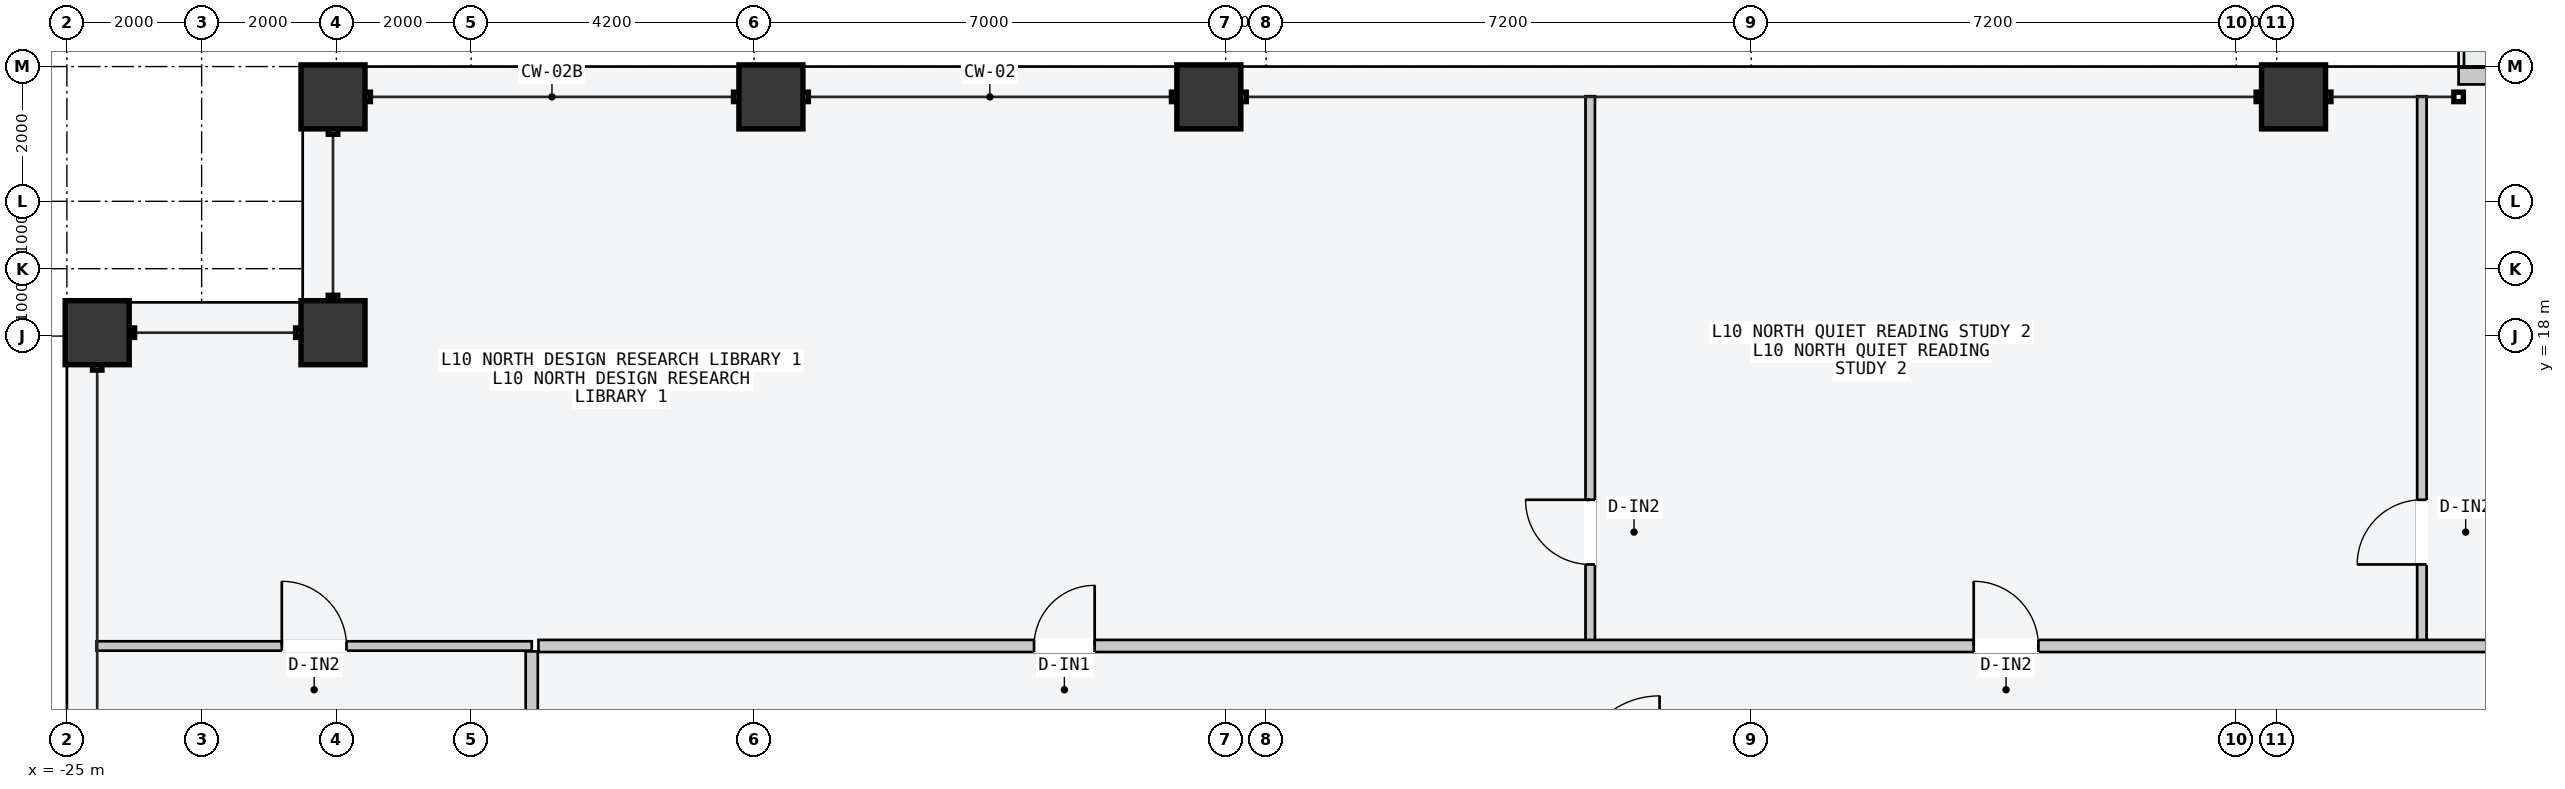
"""IFC4 building model, lengths in metres.
Left out: names, types, materials, properties, quantities, classifications, styles, units other than length and angle.
Written with IfcOpenShell. Run it as: python <this file> out.ifc"""

import sys

from ifc_helpers import new_model, si_unit, direction, frame, frame_2d, origin, origin_2d, place, context, subcontext, project, spatial, rectangle, hollow_rectangle, extrude, element, fill, save


model = new_model("IFC4")
c1 = context("Model", 3, precision=1e-05, world=origin(), true_north=direction((0.0, 1.0)))
c2 = subcontext(c1, "Body", "Model", "MODEL_VIEW")
j1 = project(units=[si_unit("LENGTHUNIT", "METRE"), si_unit("PLANEANGLEUNIT", "RADIAN")], contexts=[c1])
p1 = place(None, origin())
s1 = spatial("IfcSite", under=j1, at=p1, CompositionType="ELEMENT")
p2 = place(p1, origin())
s2 = spatial("IfcBuilding", under=s1, at=p2, CompositionType="ELEMENT")
p3 = place(p2, frame((0.0, 0.0, 42.0)))
s3 = spatial("IfcBuildingStorey", under=s2, at=p3, CompositionType="ELEMENT", Elevation=42.0)
for number, where, z_axis, x_axis in (
    (1, (-21.05, 21.55, 0.0), (0.0, 0.0, 1.0), (1.0, 0.0, 0.0)),
    (2, (-14.55, 21.55, 0.0), (0.0, 0.0, 1.0), (1.0, 0.0, 0.0)),
    (3, (-8.05, 21.55, 0.0), (0.0, 0.0, 1.0), (1.0, 0.0, 0.0)),
    (4, (8.05, 21.55, 0.0), (0.0, 0.0, 1.0), (1.0, 0.0, 0.0)),
    (5, (-24.55, 18.05, 0.0), (0.0, 0.0, 1.0), (0.0, 1.0, 0.0)),
    (6, (-21.05, 18.05, 0.0), (0.0, 0.0, 1.0), (1.0, 0.0, 0.0)),
):
    element("IfcColumn", number, at=place(p3, frame(where, z_axis=z_axis, x_axis=x_axis)), inside=s3, PredefinedType="COLUMN", context=c2, shape_type="SweptSolid", body=[
        extrude(hollow_rectangle(XDim=0.95, YDim=0.95, WallThickness=0.048, at=origin_2d()), origin(), (0.0, 0.0, 1.0), 3.6),
    ])
p4 = place(p3, frame((10.5, 21.86, 0.0), z_axis=(0.0, 0.0, 1.0), x_axis=(1.0, 0.0, 0.0)))
e7 = element("IfcWall", 7, at=p4, inside=s3, PredefinedType="STANDARD", context=c2, shape_type="SweptSolid", body=[
    extrude(rectangle(XDim=3.555, YDim=0.25, at=frame_2d((1.777, 0.0))), origin(), (0.0, 0.0, 1.0), 3.4),
])
p5 = place(p4, frame((0.7, 0.0, 0.85)))
e8 = element("IfcOpeningElement", 8, at=p5, cuts=e7, PredefinedType="OPENING", context=c2, shape_type="SweptSolid", body=[
    extrude(rectangle(XDim=2.2, YDim=2.1, at=frame_2d((1.1, 1.05))), frame((0.0, 0.135, 0.0), z_axis=(0.0, -1.0, 0.0), x_axis=(1.0, 0.0, 0.0)), (0.0, 0.0, 1.0), 0.27),
])
p6 = place(p3, frame((-2.389, 13.46, 0.0), z_axis=(0.0, 0.0, 1.0), x_axis=(0.0, 1.0, 0.0)))
e9 = element("IfcWall", 9, at=p6, inside=s3, PredefinedType="PARTITIONING", context=c2, shape_type="SweptSolid", body=[
    extrude(rectangle(XDim=8.1, YDim=0.14, at=frame_2d((4.05, 0.0))), origin(), (0.0, 0.0, 1.0), 3.4),
])
p7 = place(p6, frame((1.15, 0.0, 0.0)))
e10 = element("IfcOpeningElement", 10, at=p7, cuts=e9, PredefinedType="OPENING", context=c2, shape_type="SweptSolid", body=[
    extrude(rectangle(XDim=0.96, YDim=2.18, at=frame_2d((0.48, 1.09))), frame((0.0, 0.08, 0.0), z_axis=(0.0, -1.0, 0.0), x_axis=(1.0, 0.0, 0.0)), (0.0, 0.0, 1.0), 0.16),
])
p8 = place(p3, frame((9.955, 13.46, 0.0), z_axis=(0.0, 0.0, 1.0), x_axis=(0.0, 1.0, 0.0)))
e11 = element("IfcWall", 11, at=p8, inside=s3, PredefinedType="PARTITIONING", context=c2, shape_type="SweptSolid", body=[
    extrude(rectangle(XDim=8.1, YDim=0.14, at=frame_2d((4.05, 0.0))), origin(), (0.0, 0.0, 1.0), 3.4),
])
p9 = place(p8, frame((1.15, 0.0, 0.0)))
e12 = element("IfcOpeningElement", 12, at=p9, cuts=e11, PredefinedType="OPENING", context=c2, shape_type="SweptSolid", body=[
    extrude(rectangle(XDim=0.96, YDim=2.18, at=frame_2d((0.48, 1.09))), frame((0.0, 0.08, 0.0), z_axis=(0.0, -1.0, 0.0), x_axis=(1.0, 0.0, 0.0)), (0.0, 0.0, 1.0), 0.16),
])
p10 = place(p3, frame((-18.0, 13.4, 0.0), z_axis=(0.0, 0.0, 1.0), x_axis=(1.0, 0.0, 0.0)))
e13 = element("IfcWall", 13, at=p10, inside=s3, PredefinedType="PARTITIONING", context=c2, shape_type="SweptSolid", body=[
    extrude(rectangle(XDim=36.0, YDim=0.18, at=frame_2d((18.0, 0.0))), origin(), (0.0, 0.0, 1.0), 3.4),
])
p11 = place(p10, frame((7.355, 0.0, 0.0)))
e14 = element("IfcOpeningElement", 14, at=p11, cuts=e13, PredefinedType="OPENING", context=c2, shape_type="SweptSolid", body=[
    extrude(rectangle(XDim=0.9, YDim=2.15, at=frame_2d((0.45, 1.075))), frame((0.0, 0.1, 0.0), z_axis=(0.0, -1.0, 0.0), x_axis=(1.0, 0.0, 0.0)), (0.0, 0.0, 1.0), 0.2),
])
p12 = place(p10, frame((21.303, 0.0, 0.0)))
e15 = element("IfcOpeningElement", 15, at=p12, cuts=e13, PredefinedType="OPENING", context=c2, shape_type="SweptSolid", body=[
    extrude(rectangle(XDim=0.96, YDim=2.18, at=frame_2d((0.48, 1.09))), frame((0.0, 0.1, 0.0), z_axis=(0.0, -1.0, 0.0), x_axis=(1.0, 0.0, 0.0)), (0.0, 0.0, 1.0), 0.2),
])
p13 = place(p10, frame((31.468, 0.0, 0.0)))
e16 = element("IfcOpeningElement", 16, at=p13, cuts=e13, PredefinedType="OPENING", context=c2, shape_type="SweptSolid", body=[
    extrude(rectangle(XDim=1.02, YDim=2.2, at=frame_2d((0.51, 1.1))), frame((0.0, 0.1, 0.0), z_axis=(0.0, -1.0, 0.0), x_axis=(1.0, 0.0, 0.0)), (0.0, 0.0, 1.0), 0.2),
])
p14 = place(p3, frame((-24.56, 13.4, 0.0), z_axis=(0.0, 0.0, 1.0), x_axis=(1.0, 0.0, 0.0)))
e17 = element("IfcWall", 17, at=p14, inside=s3, PredefinedType="PARTITIONING", context=c2, shape_type="SweptSolid", body=[
    extrude(rectangle(XDim=6.46, YDim=0.14, at=frame_2d((3.23, 0.0))), origin(), (0.0, 0.0, 1.0), 3.4),
])
p15 = place(p14, frame((2.75, 0.0, 0.0)))
e18 = element("IfcOpeningElement", 18, at=p15, cuts=e17, PredefinedType="OPENING", context=c2, shape_type="SweptSolid", body=[
    extrude(rectangle(XDim=0.96, YDim=2.18, at=frame_2d((0.48, 1.09))), frame((0.0, 0.08, 0.0), z_axis=(0.0, -1.0, 0.0), x_axis=(1.0, 0.0, 0.0)), (0.0, 0.0, 1.0), 0.16),
])
p16 = place(p3, frame((-18.1, -13.32, 0.0), z_axis=(0.0, 0.0, 1.0), x_axis=(0.0, 1.0, 0.0)))
e19 = element("IfcWall", 19, at=p16, inside=s3, PredefinedType="PARTITIONING", context=c2, shape_type="SweptSolid", body=[
    extrude(rectangle(XDim=26.64, YDim=0.18, at=frame_2d((13.32, 0.0))), origin(), (0.0, 0.0, 1.0), 3.4),
])
p17 = place(p16, frame((4.049, 0.0, 0.0)))
e20 = element("IfcOpeningElement", 20, at=p17, cuts=e19, PredefinedType="OPENING", context=c2, shape_type="SweptSolid", body=[
    extrude(rectangle(XDim=0.96, YDim=2.18, at=frame_2d((0.48, 1.09))), frame((0.0, 0.1, 0.0), z_axis=(0.0, -1.0, 0.0), x_axis=(1.0, 0.0, 0.0)), (0.0, 0.0, 1.0), 0.2),
])
p18 = place(p16, frame((17.339, 0.0, 0.0)))
e21 = element("IfcOpeningElement", 21, at=p18, cuts=e19, PredefinedType="OPENING", context=c2, shape_type="SweptSolid", body=[
    extrude(rectangle(XDim=1.02, YDim=2.2, at=frame_2d((0.51, 1.1))), frame((0.0, 0.1, 0.0), z_axis=(0.0, -1.0, 0.0), x_axis=(1.0, 0.0, 0.0)), (0.0, 0.0, 1.0), 0.2),
])
p19 = place(p7, origin())
e22 = element("IfcDoor", 22, at=p19, inside=s3, OperationType="SINGLE_SWING_RIGHT", PredefinedType="DOOR", context=c2, shape_type="SweptSolid", body=[
    extrude(rectangle(XDim=0.96, YDim=2.18, at=frame_2d((0.48, 1.09))), frame((0.0, 0.025, 0.0), z_axis=(0.0, -1.0, 0.0), x_axis=(1.0, 0.0, 0.0)), (0.0, 0.0, 1.0), 0.05),
])
fill(e10, e22)
p20 = place(p9, origin())
e23 = element("IfcDoor", 23, at=p20, inside=s3, OperationType="SINGLE_SWING_LEFT", PredefinedType="DOOR", context=c2, shape_type="SweptSolid", body=[
    extrude(rectangle(XDim=0.96, YDim=2.18, at=frame_2d((0.48, 1.09))), frame((0.0, 0.025, 0.0), z_axis=(0.0, -1.0, 0.0), x_axis=(1.0, 0.0, 0.0)), (0.0, 0.0, 1.0), 0.05),
])
fill(e12, e23)
p21 = place(p11, origin())
e24 = element("IfcDoor", 24, at=p21, inside=s3, OperationType="SINGLE_SWING_RIGHT", PredefinedType="DOOR", context=c2, shape_type="SweptSolid", body=[
    extrude(rectangle(XDim=0.9, YDim=2.15, at=frame_2d((0.45, 1.075))), frame((0.0, 0.025, 0.0), z_axis=(0.0, -1.0, 0.0), x_axis=(1.0, 0.0, 0.0)), (0.0, 0.0, 1.0), 0.05),
])
fill(e14, e24)
p22 = place(p12, origin())
e25 = element("IfcDoor", 25, at=p22, inside=s3, OperationType="SINGLE_SWING_LEFT", PredefinedType="DOOR", context=c2, shape_type="SweptSolid", body=[
    extrude(rectangle(XDim=0.96, YDim=2.18, at=frame_2d((0.48, 1.09))), frame((0.0, 0.025, 0.0), z_axis=(0.0, -1.0, 0.0), x_axis=(1.0, 0.0, 0.0)), (0.0, 0.0, 1.0), 0.05),
])
fill(e15, e25)
p23 = place(p15, origin())
e26 = element("IfcDoor", 26, at=p23, inside=s3, OperationType="SINGLE_SWING_LEFT", PredefinedType="DOOR", context=c2, shape_type="SweptSolid", body=[
    extrude(rectangle(XDim=0.96, YDim=2.18, at=frame_2d((0.48, 1.09))), frame((0.0, 0.025, 0.0), z_axis=(0.0, -1.0, 0.0), x_axis=(1.0, 0.0, 0.0)), (0.0, 0.0, 1.0), 0.05),
])
fill(e18, e26)
save(model, sys.argv[1])
